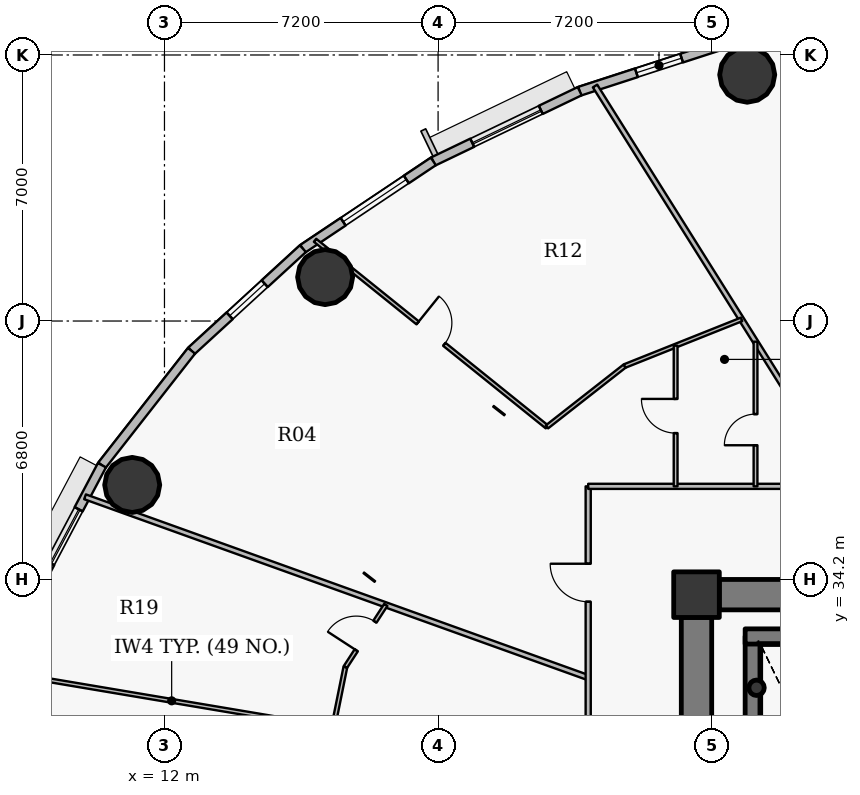
"""IFC4 building model, lengths in metres.
Left out: names, types, materials, properties, quantities, classifications, styles, units other than length and angle.
Written with IfcOpenShell. Run it as: python <this file> out.ifc"""

import sys

from ifc_helpers import new_model, si_unit, direction, frame, frame_2d, origin, origin_2d, place, context, subcontext, project, spatial, rectangle, hollow_circle, extrude, source, transform, mapped, element, fill, save


model = new_model("IFC4")
c1 = context("Model", 3, precision=1e-05, world=origin(), true_north=direction((0.0, 1.0)))
c2 = subcontext(c1, "Body", "Model", "MODEL_VIEW")
j1 = project(units=[si_unit("LENGTHUNIT", "METRE"), si_unit("PLANEANGLEUNIT", "RADIAN")], contexts=[c1])
p1 = place(None, origin())
s1 = spatial("IfcSite", under=j1, at=p1, CompositionType="ELEMENT")
p2 = place(p1, origin())
s2 = spatial("IfcBuilding", under=s1, at=p2, CompositionType="ELEMENT")
p3 = place(p2, frame((0.0, 0.0, 115.95)))
s3 = spatial("IfcBuildingStorey", under=s2, at=p3, CompositionType="ELEMENT", Elevation=115.95)
p4 = place(p3, frame((26.0, 33.8, 0.0), z_axis=(0.0, 0.0, 1.0), x_axis=(1.0, 0.0, 0.0)))
e1 = element("IfcColumn", 1, at=p4, inside=s3, PredefinedType="COLUMN", context=c2, shape_type="SweptSolid", body=[
    extrude(rectangle(XDim=1.2, YDim=1.2, at=origin_2d()), origin(), (0.0, 0.0, 1.0), 3.75),
])
p5 = place(p3, frame((27.48, 24.1, 0.0), z_axis=(0.0, 0.0, 1.0), x_axis=(0.0, 1.0, 0.0)))
e2 = element("IfcWall", 2, at=p5, inside=s3, PredefinedType="SHEAR", context=c2, shape_type="SweptSolid", body=[
    extrude(rectangle(XDim=8.6, YDim=0.4, at=frame_2d((4.3, 0.0))), origin(), (0.0, 0.0, 1.0), 3.75),
])
p6 = place(p3, frame((27.28, 32.7, 0.0), z_axis=(0.0, 0.0, 1.0), x_axis=(1.0, 0.0, 0.0)))
e3 = element("IfcWall", 3, at=p6, inside=s3, PredefinedType="SHEAR", context=c2, shape_type="SweptSolid", body=[
    extrude(rectangle(XDim=4.1, YDim=0.4, at=frame_2d((2.05, 0.0))), origin(), (0.0, 0.0, 1.0), 3.75),
])
p7 = place(p3, frame((27.58, 31.35, 0.0), z_axis=(0.0, 0.0, 1.0), x_axis=(1.0, 0.0, 0.0)))
e4 = element("IfcColumn", 4, at=p7, inside=s3, PredefinedType="COLUMN", context=c2, shape_type="SweptSolid", body=[
    extrude(hollow_circle(Radius=0.203, WallThickness=0.016, at=origin_2d()), origin(), (0.0, 0.0, 1.0), 3.75),
])
p8 = place(p3, frame((26.6, 33.8, 0.0), z_axis=(0.0, 0.0, 1.0), x_axis=(1.0, 0.0, 0.0)))
e5 = element("IfcWall", 5, at=p8, inside=s3, PredefinedType="SHEAR", context=c2, shape_type="SweptSolid", body=[
    extrude(rectangle(XDim=18.8, YDim=0.8, at=frame_2d((9.4, 0.0))), origin(), (0.0, 0.0, 1.0), 2.95),
])
p9 = place(p3, frame((26.0, 20.8, 0.0), z_axis=(0.0, 0.0, 1.0), x_axis=(0.0, 1.0, 0.0)))
e6 = element("IfcWall", 6, at=p9, inside=s3, PredefinedType="SHEAR", context=c2, shape_type="SweptSolid", body=[
    extrude(rectangle(XDim=12.4, YDim=0.8, at=frame_2d((6.2, 0.0))), origin(), (0.0, 0.0, 1.0), 2.95),
])
p10 = place(p9, frame((5.79, 0.0, 0.0)))
e7 = element("IfcOpeningElement", 7, at=p10, cuts=e6, PredefinedType="OPENING", context=c2, shape_type="SweptSolid", body=[
    extrude(rectangle(XDim=0.82, YDim=2.1, at=origin_2d()), frame((0.41, 0.41, 1.05), z_axis=(0.0, -1.0, 0.0), x_axis=(1.0, 0.0, 0.0)), (0.0, 0.0, 1.0), 0.82),
])
for number, where, z_axis, x_axis in (
    (8, (27.334, 47.481, 0.0), (0.0, 0.0, 1.0), (1.0, 0.0, 0.0)),
    (9, (16.227, 42.156, 0.0), (0.0, 0.0, 1.0), (1.0, 0.0, 0.0)),
    (10, (11.151, 36.688, 0.0), (0.0, 0.0, 1.0), (1.0, 0.0, 0.0)),
):
    element("IfcColumn", number, at=place(p3, frame(where, z_axis=z_axis, x_axis=x_axis)), inside=s3, PredefinedType="COLUMN", context=c2, shape_type="SweptSolid", body=[
        extrude(hollow_circle(Radius=0.725, WallThickness=0.042, at=origin_2d()), origin(), (0.0, 0.0, 1.0), 3.75),
    ])
p11 = place(p3, frame((22.926, 47.047, 0.0), z_axis=(0.0, 0.0, 1.0), x_axis=(0.951211346073, 0.308540070495, 0.0)))
e11 = element("IfcWall", 11, at=p11, inside=s3, PredefinedType="SOLIDWALL", context=c2, shape_type="SweptSolid", body=[
    extrude(rectangle(XDim=4.388, YDim=0.24, at=frame_2d((2.194, 0.0))), origin(), (0.0, 0.0, 1.0), 3.5),
])
p12 = place(p11, frame((1.569, 0.0, 0.9)))
e12 = element("IfcOpeningElement", 12, at=p12, cuts=e11, PredefinedType="OPENING", context=c2, shape_type="SweptSolid", body=[
    extrude(rectangle(XDim=1.25, YDim=1.65, at=origin_2d()), frame((0.625, 0.13, 0.825), z_axis=(0.0, -1.0, 0.0), x_axis=(1.0, 0.0, 0.0)), (0.0, 0.0, 1.0), 0.26),
])
p13 = place(p3, frame((19.075, 45.199, 0.0), z_axis=(0.0, 0.0, 1.0), x_axis=(0.901589935876, 0.432591709962, 0.0)))
e13 = element("IfcWall", 13, at=p13, inside=s3, PredefinedType="SOLIDWALL", context=c2, shape_type="SweptSolid", body=[
    extrude(rectangle(XDim=4.272, YDim=0.24, at=frame_2d((2.136, 0.0))), origin(), (0.0, 0.0, 1.0), 3.5),
])
p14 = place(p13, frame((1.136, 0.0, 0.9)))
e14 = element("IfcOpeningElement", 14, at=p14, cuts=e13, PredefinedType="OPENING", context=c2, shape_type="SweptSolid", body=[
    extrude(rectangle(XDim=2.0, YDim=1.75, at=origin_2d()), frame((1.0, 0.13, 0.875), z_axis=(0.0, -1.0, 0.0), x_axis=(1.0, 0.0, 0.0)), (0.0, 0.0, 1.0), 0.26),
])
p15 = place(p3, frame((15.642, 42.903, 0.0), z_axis=(0.0, 0.0, 1.0), x_axis=(0.831221811447, 0.555940914284, 0.0)))
e15 = element("IfcWall", 15, at=p15, inside=s3, PredefinedType="SOLIDWALL", context=c2, shape_type="SweptSolid", body=[
    extrude(rectangle(XDim=4.13, YDim=0.24, at=frame_2d((2.065, 0.0))), origin(), (0.0, 0.0, 1.0), 3.5),
])
p16 = place(p15, frame((1.276, 0.0, 0.9)))
e16 = element("IfcOpeningElement", 16, at=p16, cuts=e15, PredefinedType="OPENING", context=c2, shape_type="SweptSolid", body=[
    extrude(rectangle(XDim=2.0, YDim=1.75, at=origin_2d()), frame((1.0, 0.13, 0.875), z_axis=(0.0, -1.0, 0.0), x_axis=(1.0, 0.0, 0.0)), (0.0, 0.0, 1.0), 0.26),
])
p17 = place(p3, frame((12.711, 40.217, 0.0), z_axis=(0.0, 0.0, 1.0), x_axis=(0.737113356241, 0.675769117414, 0.0)))
e17 = element("IfcWall", 17, at=p17, inside=s3, PredefinedType="SOLIDWALL", context=c2, shape_type="SweptSolid", body=[
    extrude(rectangle(XDim=3.976, YDim=0.24, at=frame_2d((1.988, 0.0))), origin(), (0.0, 0.0, 1.0), 3.5),
])
p18 = place(p17, frame((1.363, 0.0, 0.9)))
e18 = element("IfcOpeningElement", 18, at=p18, cuts=e17, PredefinedType="OPENING", context=c2, shape_type="SweptSolid", body=[
    extrude(rectangle(XDim=1.25, YDim=1.65, at=origin_2d()), frame((0.625, 0.13, 0.825), z_axis=(0.0, -1.0, 0.0), x_axis=(1.0, 0.0, 0.0)), (0.0, 0.0, 1.0), 0.26),
])
p19 = place(p3, frame((10.355, 37.206, 0.0), z_axis=(0.0, 0.0, 1.0), x_axis=(0.616272103517, 0.787533297345, 0.0)))
e19 = element("IfcWall", 19, at=p19, inside=s3, PredefinedType="SOLIDWALL", context=c2, shape_type="SweptSolid", body=[
    extrude(rectangle(XDim=3.823, YDim=0.24, at=frame_2d((1.912, 0.0))), origin(), (0.0, 0.0, 1.0), 3.5),
])
p20 = place(p3, frame((8.63, 33.945, 0.0), z_axis=(0.0, 0.0, 1.0), x_axis=(0.467614004126, 0.883932770716, 0.0)))
e20 = element("IfcWall", 20, at=p20, inside=s3, PredefinedType="SOLIDWALL", context=c2, shape_type="SweptSolid", body=[
    extrude(rectangle(XDim=3.689, YDim=0.24, at=frame_2d((1.844, 0.0))), origin(), (0.0, 0.0, 1.0), 3.5),
])
p21 = place(p20, frame((0.778, 0.0, 0.9)))
e21 = element("IfcOpeningElement", 21, at=p21, cuts=e20, PredefinedType="OPENING", context=c2, shape_type="SweptSolid", body=[
    extrude(rectangle(XDim=1.6, YDim=1.75, at=origin_2d()), frame((0.8, 0.13, 0.875), z_axis=(0.0, -1.0, 0.0), x_axis=(1.0, 0.0, 0.0)), (0.0, 0.0, 1.0), 0.26),
])
p22 = place(p3, frame((7.943, 31.721, 0.0), z_axis=(0.0, 0.0, 1.0), x_axis=(0.986139151265, -0.165920385556, 0.0)))
e22 = element("IfcWall", 22, at=p22, inside=s3, PredefinedType="PARTITIONING", context=c2, shape_type="SweptSolid", body=[
    extrude(rectangle(XDim=8.612, YDim=0.1, at=frame_2d((4.306, 0.0))), origin(), (0.0, 0.0, 1.0), 2.935),
])
p23 = place(p3, frame((9.91, 36.375, 0.0), z_axis=(0.0, 0.0, 1.0), x_axis=(0.941089213164, -0.338158384292, 0.0)))
e23 = element("IfcWall", 23, at=p23, inside=s3, PredefinedType="PARTITIONING", context=c2, shape_type="SweptSolid", body=[
    extrude(rectangle(XDim=14.069, YDim=0.135, at=frame_2d((7.035, 0.0))), origin(), (0.0, 0.0, 1.0), 2.935),
])
p24 = place(p3, frame((15.945, 27.865, 0.0), z_axis=(0.0, 0.0, 1.0), x_axis=(0.198216891741, 0.980158183065, 0.0)))
e24 = element("IfcWall", 24, at=p24, inside=s3, PredefinedType="PARTITIONING", context=c2, shape_type="SweptSolid", body=[
    extrude(rectangle(XDim=4.111, YDim=0.1, at=frame_2d((2.056, 0.0))), origin(), (0.0, 0.0, 1.0), 3.5),
])
p25 = place(p3, frame((15.963, 43.124, 0.0), z_axis=(0.0, 0.0, 1.0), x_axis=(0.779083359145, -0.626920345421, 0.0)))
e25 = element("IfcWall", 25, at=p25, inside=s3, PredefinedType="PARTITIONING", context=c2, shape_type="SweptSolid", body=[
    extrude(rectangle(XDim=7.831, YDim=0.1, at=frame_2d((3.916, 0.0))), origin(), (0.0, 0.0, 1.0), 2.935),
])
p26 = place(p25, frame((3.466, 0.0, 0.0)))
e26 = element("IfcOpeningElement", 26, at=p26, cuts=e25, PredefinedType="OPENING", context=c2, shape_type="SweptSolid", body=[
    extrude(rectangle(XDim=0.9, YDim=2.1, at=origin_2d()), frame((0.45, 0.06, 1.05), z_axis=(0.0, -1.0, 0.0), x_axis=(1.0, 0.0, 0.0)), (0.0, 0.0, 1.0), 0.12),
])
p27 = place(p3, frame((16.76, 31.895, 0.0), z_axis=(0.0, 0.0, 1.0), x_axis=(0.545370803514, 0.838194897786, 0.0)))
e27 = element("IfcWall", 27, at=p27, inside=s3, PredefinedType="PARTITIONING", context=c2, shape_type="SweptSolid", body=[
    extrude(rectangle(XDim=1.952, YDim=0.1, at=frame_2d((0.976, 0.0))), origin(), (0.0, 0.0, 1.0), 3.5),
])
p28 = place(p27, frame((0.526, 0.0, 0.0)))
e28 = element("IfcOpeningElement", 28, at=p28, cuts=e27, PredefinedType="OPENING", context=c2, shape_type="SweptSolid", body=[
    extrude(rectangle(XDim=0.9, YDim=2.1, at=origin_2d()), frame((0.45, 0.06, 1.05), z_axis=(0.0, -1.0, 0.0), x_axis=(1.0, 0.0, 0.0)), (0.0, 0.0, 1.0), 0.12),
])
p29 = place(p3, frame((22.064, 38.214, 0.0), z_axis=(0.0, 0.0, 1.0), x_axis=(0.787364158956, 0.616488184146, 0.0)))
e29 = element("IfcWall", 29, at=p29, inside=s3, PredefinedType="PARTITIONING", context=c2, shape_type="SweptSolid", body=[
    extrude(rectangle(XDim=2.597, YDim=0.1, at=frame_2d((1.299, 0.0))), origin(), (0.0, 0.0, 1.0), 3.5),
])
p30 = place(p3, frame((23.15, 17.35, 0.0), z_axis=(0.0, 0.0, 1.0), x_axis=(0.0, 1.0, 0.0)))
e30 = element("IfcWall", 30, at=p30, inside=s3, PredefinedType="PARTITIONING", context=c2, shape_type="SweptSolid", body=[
    extrude(rectangle(XDim=19.3, YDim=0.135, at=frame_2d((9.65, 0.0))), origin(), (0.0, 0.0, 1.0), 2.935),
])
p31 = place(p30, frame((16.264, 0.0, 0.0)))
e31 = element("IfcOpeningElement", 31, at=p31, cuts=e30, PredefinedType="OPENING", context=c2, shape_type="SweptSolid", body=[
    extrude(rectangle(XDim=1.0, YDim=2.15, at=origin_2d()), frame((0.5, 0.078, 1.075), z_axis=(0.0, -1.0, 0.0), x_axis=(1.0, 0.0, 0.0)), (0.0, 0.0, 1.0), 0.155),
])
p32 = place(p30, frame((7.426, 0.0, 0.0)))
e32 = element("IfcOpeningElement", 32, at=p32, cuts=e30, PredefinedType="OPENING", context=c2, shape_type="SweptSolid", body=[
    extrude(rectangle(XDim=1.0, YDim=2.15, at=origin_2d()), frame((0.5, 0.078, 1.075), z_axis=(0.0, -1.0, 0.0), x_axis=(1.0, 0.0, 0.0)), (0.0, 0.0, 1.0), 0.155),
])
p33 = place(p3, frame((23.15, 36.65, 0.0), z_axis=(0.0, 0.0, 1.0), x_axis=(1.0, 0.0, 0.0)))
e33 = element("IfcWall", 33, at=p33, inside=s3, PredefinedType="PARTITIONING", context=c2, shape_type="SweptSolid", body=[
    extrude(rectangle(XDim=10.612, YDim=0.135, at=frame_2d((5.306, 0.0))), origin(), (0.0, 0.0, 1.0), 2.935),
])
p34 = place(p33, frame((8.182, 0.0, 0.0)))
e34 = element("IfcOpeningElement", 34, at=p34, cuts=e33, PredefinedType="OPENING", context=c2, shape_type="SweptSolid", body=[
    extrude(rectangle(XDim=1.0, YDim=2.15, at=origin_2d()), frame((0.5, 0.078, 1.075), z_axis=(0.0, -1.0, 0.0), x_axis=(1.0, 0.0, 0.0)), (0.0, 0.0, 1.0), 0.155),
])
p35 = place(p3, frame((23.33, 47.184, 0.0), z_axis=(0.0, 0.0, 1.0), x_axis=(0.531660079213, -0.846957826678, 0.0)))
e35 = element("IfcWall", 35, at=p35, inside=s3, PredefinedType="PARTITIONING", context=c2, shape_type="SweptSolid", body=[
    extrude(rectangle(XDim=12.437, YDim=0.135, at=frame_2d((6.219, 0.0))), origin(), (0.0, 0.0, 1.0), 2.935),
])
p36 = place(p3, frame((24.109, 39.816, 0.0), z_axis=(0.0, 0.0, 1.0), x_axis=(0.928811896505, 0.370551563092, 0.0)))
e36 = element("IfcWall", 36, at=p36, inside=s3, PredefinedType="PARTITIONING", context=c2, shape_type="SweptSolid", body=[
    extrude(rectangle(XDim=3.312, YDim=0.1, at=frame_2d((1.656, 0.0))), origin(), (0.0, 0.0, 1.0), 3.5),
])
p37 = place(p3, frame((25.451, 36.65, 0.0), z_axis=(0.0, 0.0, 1.0), x_axis=(0.0, 1.0, 0.0)))
e37 = element("IfcWall", 37, at=p37, inside=s3, PredefinedType="PARTITIONING", context=c2, shape_type="SweptSolid", body=[
    extrude(rectangle(XDim=3.701, YDim=0.1, at=frame_2d((1.851, 0.0))), origin(), (0.0, 0.0, 1.0), 3.5),
])
p38 = place(p37, frame((1.4, 0.0, 0.0)))
e38 = element("IfcOpeningElement", 38, at=p38, cuts=e37, PredefinedType="OPENING", context=c2, shape_type="SweptSolid", body=[
    extrude(rectangle(XDim=0.9, YDim=2.1, at=origin_2d()), frame((0.45, 0.06, 1.05), z_axis=(0.0, -1.0, 0.0), x_axis=(1.0, 0.0, 0.0)), (0.0, 0.0, 1.0), 0.12),
])
p39 = place(p3, frame((27.553, 36.65, 0.0), z_axis=(0.0, 0.0, 1.0), x_axis=(0.0, 1.0, 0.0)))
e39 = element("IfcWall", 39, at=p39, inside=s3, PredefinedType="PARTITIONING", context=c2, shape_type="SweptSolid", body=[
    extrude(rectangle(XDim=3.806, YDim=0.1, at=frame_2d((1.903, 0.0))), origin(), (0.0, 0.0, 1.0), 3.5),
])
p40 = place(p39, frame((1.081, 0.0, 0.0)))
e40 = element("IfcOpeningElement", 40, at=p40, cuts=e39, PredefinedType="OPENING", context=c2, shape_type="SweptSolid", body=[
    extrude(rectangle(XDim=0.82, YDim=2.1, at=origin_2d()), frame((0.41, 0.06, 1.05), z_axis=(0.0, -1.0, 0.0), x_axis=(1.0, 0.0, 0.0)), (0.0, 0.0, 1.0), 0.12),
])
p41 = place(p3, frame((26.59, 34.2, 0.0), z_axis=(0.0, 0.0, 1.0), x_axis=(-1.0, 0.0, 0.0)))
e41 = element("IfcWall", 41, at=p41, inside=s3, PredefinedType="PARTITIONING", context=c2, shape_type="SweptSolid", body=[
    extrude(rectangle(XDim=0.99, YDim=0.135, at=frame_2d((0.495, 0.0))), origin(), (0.0, 0.0, 1.0), 2.935),
])
p42 = place(p3, frame((25.6, 33.893, 0.0), z_axis=(0.0, 0.0, 1.0), x_axis=(0.0, -1.0, 0.0)))
e42 = element("IfcWall", 42, at=p42, inside=s3, PredefinedType="PARTITIONING", context=c2, shape_type="SweptSolid", body=[
    extrude(rectangle(XDim=0.683, YDim=0.135, at=frame_2d((0.341, 0.0))), origin(), (0.0, 0.0, 1.0), 3.5),
])
m1 = source(origin(), c2, "Body", "SweptSolid", [
    extrude(rectangle(XDim=2.0, YDim=1.75, at=origin_2d()), frame((1.0, 0.03, 0.875), z_axis=(0.0, -1.0, 0.0), x_axis=(1.0, 0.0, 0.0)), (0.0, 0.0, 1.0), 0.06),
])
p43 = place(p14, origin())
e43 = element("IfcWindow", 43, at=p43, inside=s3, PartitioningType="DOUBLE_PANEL_VERTICAL", PredefinedType="WINDOW", context=c2, shape_type="MappedRepresentation", body=[
    mapped(m1, transform((0.0, 0.0, 0.0), x_axis=(1.0, 0.0, 0.0), y_axis=(0.0, 1.0, 0.0), z_axis=(0.0, 0.0, 1.0), scale=1.0)),
])
fill(e14, e43)
p44 = place(p16, origin())
e44 = element("IfcWindow", 44, at=p44, inside=s3, PartitioningType="DOUBLE_PANEL_VERTICAL", PredefinedType="WINDOW", context=c2, shape_type="MappedRepresentation", body=[
    mapped(m1, transform((0.0, 0.0, 0.0), x_axis=(1.0, 0.0, 0.0), y_axis=(0.0, 1.0, 0.0), z_axis=(0.0, 0.0, 1.0), scale=1.0)),
])
fill(e16, e44)
m2 = source(origin(), c2, "Body", "SweptSolid", [
    extrude(rectangle(XDim=1.6, YDim=1.75, at=origin_2d()), frame((0.8, 0.03, 0.875), z_axis=(0.0, -1.0, 0.0), x_axis=(1.0, 0.0, 0.0)), (0.0, 0.0, 1.0), 0.06),
])
p45 = place(p21, origin())
e45 = element("IfcWindow", 45, at=p45, inside=s3, PartitioningType="DOUBLE_PANEL_VERTICAL", PredefinedType="WINDOW", context=c2, shape_type="MappedRepresentation", body=[
    mapped(m2, transform((0.0, 0.0, 0.0), x_axis=(1.0, 0.0, 0.0), y_axis=(0.0, 1.0, 0.0), z_axis=(0.0, 0.0, 1.0), scale=1.0)),
])
fill(e21, e45)
m3 = source(origin(), c2, "Body", "SweptSolid", [
    extrude(rectangle(XDim=1.25, YDim=1.65, at=origin_2d()), frame((0.625, 0.03, 0.825), z_axis=(0.0, -1.0, 0.0), x_axis=(1.0, 0.0, 0.0)), (0.0, 0.0, 1.0), 0.06),
])
p46 = place(p12, origin())
e46 = element("IfcWindow", 46, at=p46, inside=s3, PartitioningType="SINGLE_PANEL", PredefinedType="WINDOW", context=c2, shape_type="MappedRepresentation", body=[
    mapped(m3, transform((0.0, 0.0, 0.0), x_axis=(1.0, 0.0, 0.0), y_axis=(0.0, 1.0, 0.0), z_axis=(0.0, 0.0, 1.0), scale=1.0)),
])
fill(e12, e46)
p47 = place(p18, origin())
e47 = element("IfcWindow", 47, at=p47, inside=s3, PartitioningType="SINGLE_PANEL", PredefinedType="WINDOW", context=c2, shape_type="MappedRepresentation", body=[
    mapped(m3, transform((0.0, 0.0, 0.0), x_axis=(1.0, 0.0, 0.0), y_axis=(0.0, 1.0, 0.0), z_axis=(0.0, 0.0, 1.0), scale=1.0)),
])
fill(e18, e47)
m4 = source(origin(), c2, "Body", "SweptSolid", [
    extrude(rectangle(XDim=1.0, YDim=2.15, at=origin_2d()), frame((0.5, 0.025, 1.075), z_axis=(0.0, -1.0, 0.0), x_axis=(1.0, 0.0, 0.0)), (0.0, 0.0, 1.0), 0.05),
])
p48 = place(p31, origin())
e48 = element("IfcDoor", 48, at=p48, inside=s3, OperationType="SINGLE_SWING_RIGHT", PredefinedType="DOOR", context=c2, shape_type="MappedRepresentation", body=[
    mapped(m4, transform((0.0, 0.0, 0.0), x_axis=(1.0, 0.0, 0.0), y_axis=(0.0, 1.0, 0.0), z_axis=(0.0, 0.0, 1.0), scale=1.0)),
])
fill(e31, e48)
m5 = source(origin(), c2, "Body", "SweptSolid", [
    extrude(rectangle(XDim=0.9, YDim=2.1, at=origin_2d()), frame((0.45, 0.025, 1.05), z_axis=(0.0, -1.0, 0.0), x_axis=(1.0, 0.0, 0.0)), (0.0, 0.0, 1.0), 0.05),
])
p49 = place(p26, origin())
e49 = element("IfcDoor", 49, at=p49, inside=s3, OperationType="SINGLE_SWING_LEFT", PredefinedType="DOOR", context=c2, shape_type="MappedRepresentation", body=[
    mapped(m5, transform((0.0, 0.0, 0.0), x_axis=(1.0, 0.0, 0.0), y_axis=(0.0, 1.0, 0.0), z_axis=(0.0, 0.0, 1.0), scale=1.0)),
])
fill(e26, e49)
p50 = place(p38, origin())
e50 = element("IfcDoor", 50, at=p50, inside=s3, OperationType="SINGLE_SWING_RIGHT", PredefinedType="DOOR", context=c2, shape_type="MappedRepresentation", body=[
    mapped(m5, transform((0.0, 0.0, 0.0), x_axis=(1.0, 0.0, 0.0), y_axis=(0.0, 1.0, 0.0), z_axis=(0.0, 0.0, 1.0), scale=1.0)),
])
fill(e38, e50)
m6 = source(origin(), c2, "Body", "SweptSolid", [
    extrude(rectangle(XDim=0.82, YDim=2.1, at=origin_2d()), frame((0.41, 0.025, 1.05), z_axis=(0.0, -1.0, 0.0), x_axis=(1.0, 0.0, 0.0)), (0.0, 0.0, 1.0), 0.05),
])
p51 = place(p40, origin())
e51 = element("IfcDoor", 51, at=p51, inside=s3, OperationType="SINGLE_SWING_LEFT", PredefinedType="DOOR", context=c2, shape_type="MappedRepresentation", body=[
    mapped(m6, transform((0.0, 0.0, 0.0), x_axis=(1.0, 0.0, 0.0), y_axis=(0.0, 1.0, 0.0), z_axis=(0.0, 0.0, 1.0), scale=1.0)),
])
fill(e40, e51)
p52 = place(p28, origin())
e52 = element("IfcDoor", 52, at=p52, inside=s3, OperationType="SINGLE_SWING_LEFT", PredefinedType="DOOR", context=c2, shape_type="MappedRepresentation", body=[
    mapped(m5, transform((0.0, 0.0, 0.0), x_axis=(1.0, 0.0, 0.0), y_axis=(0.0, 1.0, 0.0), z_axis=(0.0, 0.0, 1.0), scale=1.0)),
])
fill(e28, e52)
save(model, sys.argv[1])
